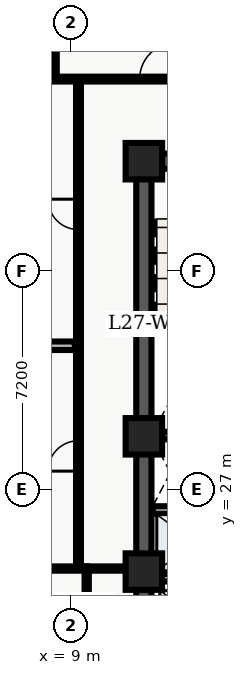
"""IFC4 building model, lengths in metres.
Left out: names, types, materials, properties, quantities, classifications, styles, units other than length and angle.
Written with IfcOpenShell. Run it as: python <this file> out.ifc"""

import sys

from ifc_helpers import new_model, entity, si_unit, converted_unit, direction, frame, origin_with_axes, origin_2d_with_axis, place, context, subcontext, project, spatial, polyline, rectangle, outline, extrude, element, fill, save


model = new_model("IFC4")
c1 = context("Model", 3, precision=1e-05, world=origin_with_axes(), true_north=direction((0.0, 1.0)))
c2 = subcontext(c1, "Body", "Model", "MODEL_VIEW")
j1 = project(units=[si_unit("LENGTHUNIT", "METRE"), converted_unit("PLANEANGLEUNIT", "DEGREE", entity("IfcPlaneAngleMeasure", 0.017), si_unit("PLANEANGLEUNIT", "RADIAN"), dimensions=[0, 0, 0, 0, 0, 0, 0])], contexts=[c1])
p1 = place(None, origin_with_axes())
s1 = spatial("IfcSite", under=j1, at=p1, CompositionType="ELEMENT")
p2 = place(p1, origin_with_axes())
s2 = spatial("IfcBuilding", under=s1, at=p2, CompositionType="ELEMENT")
p3 = place(p2, frame((0.0, 0.0, 112.5), z_axis=(0.0, 0.0, 1.0), x_axis=(1.0, 0.0, 0.0)))
s3 = spatial("IfcBuildingStorey", under=s2, at=p3, CompositionType="ELEMENT", Elevation=112.5)
p4 = place(p3, frame((11.4, 10.8, 0.0), z_axis=(0.0, 0.0, 1.0), x_axis=(0.0, 1.0, 0.0)))
e1 = element("IfcWall", 1, at=p4, inside=s3, PredefinedType="SHEAR", context=c2, shape_type="SweptSolid", body=[
    extrude(outline(polyline([(0.0, -0.25), (27.0, -0.25), (27.0, 0.25), (0.0, 0.25), (0.0, -0.25)])), origin_with_axes(), (0.0, 0.0, 1.0), 3.66),
])
p5 = place(p3, frame((11.4, 37.8, 0.0), z_axis=(0.0, 0.0, 1.0), x_axis=(1.0, 0.0, 0.0)))
e2 = element("IfcWall", 2, at=p5, inside=s3, PredefinedType="SHEAR", context=c2, shape_type="SweptSolid", body=[
    extrude(outline(polyline([(0.0, -0.25), (7.2, -0.25), (7.2, 0.25), (0.0, 0.25), (0.0, -0.25)])), origin_with_axes(), (0.0, 0.0, 1.0), 3.66),
])
p6 = place(p5, frame((2.625, 0.0, 0.0), z_axis=(0.0, 0.0, 1.0), x_axis=(1.0, 0.0, 0.0)))
e3 = element("IfcOpeningElement", 3, at=p6, cuts=e2, PredefinedType="OPENING", context=c2, shape_type="SweptSolid", body=[
    extrude(rectangle(XDim=1.05, YDim=0.52, at=origin_2d_with_axis()), origin_with_axes(), (0.0, 0.0, 1.0), 2.15),
])
p7 = place(p3, frame((11.65, 28.775, 0.0), z_axis=(0.0, 0.0, 1.0), x_axis=(1.0, 0.0, 0.0)))
e4 = element("IfcWall", 4, at=p7, inside=s3, PredefinedType="SHEAR", context=c2, shape_type="SweptSolid", body=[
    extrude(outline(polyline([(0.0, -0.125), (6.7, -0.125), (6.7, 0.125), (0.0, 0.125), (0.0, -0.125)])), origin_with_axes(), (0.0, 0.0, 1.0), 3.66),
])
p8 = place(p3, frame((11.7, 24.1, 0.0), z_axis=(0.0, 0.0, 1.0), x_axis=(1.0, 0.0, 0.0)))
e5 = element("IfcWall", 5, at=p8, inside=s3, PredefinedType="SOLIDWALL", context=c2, shape_type="SweptSolid", body=[
    extrude(outline(polyline([(0.0, -0.125), (6.6, -0.125), (6.6, 0.125), (0.0, 0.125), (0.0, -0.125)])), origin_with_axes(), (0.0, 0.0, 1.0), 2.7),
])
p9 = place(p8, frame((3.6, 0.0, 0.0), z_axis=(0.0, 0.0, 1.0), x_axis=(1.0, 0.0, 0.0)))
e6 = element("IfcOpeningElement", 6, at=p9, cuts=e5, PredefinedType="OPENING", context=c2, shape_type="SweptSolid", body=[
    extrude(rectangle(XDim=0.9, YDim=0.27, at=origin_2d_with_axis()), origin_with_axes(), (0.0, 0.0, 1.0), 2.15),
])
p10 = place(p8, frame((5.65, 0.0, 0.0), z_axis=(0.0, 0.0, 1.0), x_axis=(1.0, 0.0, 0.0)))
e7 = element("IfcOpeningElement", 7, at=p10, cuts=e5, PredefinedType="OPENING", context=c2, shape_type="SweptSolid", body=[
    extrude(rectangle(XDim=0.9, YDim=0.27, at=origin_2d_with_axis()), origin_with_axes(), (0.0, 0.0, 1.0), 2.15),
])
p11 = place(p3, frame((11.7, 26.325, 0.0), z_axis=(0.0, 0.0, 1.0), x_axis=(1.0, 0.0, 0.0)))
e8 = element("IfcWall", 8, at=p11, inside=s3, PredefinedType="SOLIDWALL", context=c2, shape_type="SweptSolid", body=[
    extrude(outline(polyline([(0.0, -0.125), (6.6, -0.125), (6.6, 0.125), (0.0, 0.125), (0.0, -0.125)])), origin_with_axes(), (0.0, 0.0, 1.0), 2.7),
])
p12 = place(p11, frame((3.5, 0.0, 0.0), z_axis=(0.0, 0.0, 1.0), x_axis=(1.0, 0.0, 0.0)))
e9 = element("IfcOpeningElement", 9, at=p12, cuts=e8, PredefinedType="OPENING", context=c2, shape_type="SweptSolid", body=[
    extrude(rectangle(XDim=0.9, YDim=0.27, at=origin_2d_with_axis()), origin_with_axes(), (0.0, 0.0, 1.0), 2.15),
])
for number, where, z_axis, x_axis in (
    (10, (11.4, 24.3, 0.0), (0.0, 0.0, 1.0), (1.0, 0.0, 0.0)),
    (11, (11.4, 28.75, 0.0), (0.0, 0.0, 1.0), (1.0, 0.0, 0.0)),
    (12, (11.4, 37.8, 0.0), (0.0, 0.0, 1.0), (1.0, 0.0, 0.0)),
):
    element("IfcColumn", number, at=place(p3, frame(where, z_axis=z_axis, x_axis=x_axis)), inside=s3, PredefinedType="COLUMN", context=c2, shape_type="SweptSolid", body=[
        extrude(rectangle(XDim=1.2, YDim=1.2, at=origin_2d_with_axis()), origin_with_axes(), (0.0, 0.0, 1.0), 3.9),
    ])
p13 = place(p3, frame((9.52, 20.4, 0.0), z_axis=(0.0, 0.0, 1.0), x_axis=(0.0, 1.0, 0.0)))
e13 = element("IfcWall", 13, at=p13, inside=s3, PredefinedType="PARTITIONING", context=c2, shape_type="SweptSolid", body=[
    extrude(outline(polyline([(0.0, -0.07), (4.0, -0.07), (4.0, 0.07), (0.0, 0.07), (0.0, -0.07)])), origin_with_axes(), (0.0, 0.0, 1.0), 2.7),
])
p14 = place(p3, frame((9.52, 24.4, 0.0), z_axis=(0.0, 0.0, 1.0), x_axis=(1.0, 0.0, 0.0)))
e14 = element("IfcWall", 14, at=p14, inside=s3, PredefinedType="PARTITIONING", context=c2, shape_type="SweptSolid", body=[
    extrude(outline(polyline([(0.0, -0.07), (1.58, -0.07), (1.58, 0.07), (0.0, 0.07), (0.0, -0.07)])), origin_with_axes(), (0.0, 0.0, 1.0), 2.7),
])
p15 = place(p3, frame((2.6, 40.5, 0.0), z_axis=(0.0, 0.0, 1.0), x_axis=(1.0, 0.0, 0.0)))
e15 = element("IfcWall", 15, at=p15, inside=s3, PredefinedType="PARTITIONING", context=c2, shape_type="SweptSolid", body=[
    extrude(outline(polyline([(0.0, -0.08), (18.65, -0.08), (18.65, 0.08), (0.0, 0.08), (0.0, -0.08)])), origin_with_axes(), (0.0, 0.0, 1.0), 2.7),
])
p16 = place(p15, frame((2.045, 0.0, 0.0), z_axis=(0.0, 0.0, 1.0), x_axis=(1.0, 0.0, 0.0)))
e16 = element("IfcOpeningElement", 16, at=p16, cuts=e15, PredefinedType="OPENING", context=c2, shape_type="SweptSolid", body=[
    extrude(rectangle(XDim=1.0, YDim=0.18, at=origin_2d_with_axis()), origin_with_axes(), (0.0, 0.0, 1.0), 2.15),
])
p17 = place(p15, frame((9.261, 0.0, 0.0), z_axis=(0.0, 0.0, 1.0), x_axis=(1.0, 0.0, 0.0)))
e17 = element("IfcOpeningElement", 17, at=p17, cuts=e15, PredefinedType="OPENING", context=c2, shape_type="SweptSolid", body=[
    extrude(rectangle(XDim=1.2, YDim=0.18, at=origin_2d_with_axis()), origin_with_axes(), (0.0, 0.0, 1.0), 2.2),
])
p18 = place(p15, frame((14.541, 0.0, 0.0), z_axis=(0.0, 0.0, 1.0), x_axis=(1.0, 0.0, 0.0)))
e18 = element("IfcOpeningElement", 18, at=p18, cuts=e15, PredefinedType="OPENING", context=c2, shape_type="SweptSolid", body=[
    extrude(rectangle(XDim=1.0, YDim=0.18, at=origin_2d_with_axis()), origin_with_axes(), (0.0, 0.0, 1.0), 2.15),
])
p19 = place(p3, frame((9.25, 24.4, 0.0), z_axis=(0.0, 0.0, 1.0), x_axis=(0.0, 1.0, 0.0)))
e19 = element("IfcWall", 19, at=p19, inside=s3, PredefinedType="PARTITIONING", context=c2, shape_type="SweptSolid", body=[
    extrude(outline(polyline([(0.0, -0.08), (16.1, -0.08), (16.1, 0.08), (0.0, 0.08), (0.0, -0.08)])), origin_with_axes(), (0.0, 0.0, 1.0), 2.7),
])
p20 = place(p19, frame((3.704, 0.0, 0.0), z_axis=(0.0, 0.0, 1.0), x_axis=(1.0, 0.0, 0.0)))
e20 = element("IfcOpeningElement", 20, at=p20, cuts=e19, PredefinedType="OPENING", context=c2, shape_type="SweptSolid", body=[
    extrude(rectangle(XDim=1.0, YDim=0.18, at=origin_2d_with_axis()), origin_with_axes(), (0.0, 0.0, 1.0), 2.15),
])
p21 = place(p19, frame((11.649, 0.0, 0.0), z_axis=(0.0, 0.0, 1.0), x_axis=(1.0, 0.0, 0.0)))
e21 = element("IfcOpeningElement", 21, at=p21, cuts=e19, PredefinedType="OPENING", context=c2, shape_type="SweptSolid", body=[
    extrude(rectangle(XDim=1.0, YDim=0.18, at=origin_2d_with_axis()), origin_with_axes(), (0.0, 0.0, 1.0), 2.15),
])
p22 = place(p3, frame((0.36, 24.4, 0.0), z_axis=(0.0, 0.0, 1.0), x_axis=(1.0, 0.0, 0.0)))
e22 = element("IfcWall", 22, at=p22, inside=s3, PredefinedType="PARTITIONING", context=c2, shape_type="SweptSolid", body=[
    extrude(outline(polyline([(0.0, -0.07), (9.16, -0.07), (9.16, 0.07), (0.0, 0.07), (0.0, -0.07)])), origin_with_axes(), (0.0, 0.0, 1.0), 2.7),
])
p23 = place(p3, frame((0.375, 31.729, 0.0), z_axis=(0.0, 0.0, 1.0), x_axis=(1.0, 0.0, 0.0)))
e23 = element("IfcWall", 23, at=p23, inside=s3, PredefinedType="PARTITIONING", context=c2, shape_type="SweptSolid", body=[
    extrude(outline(polyline([(0.0, -0.14), (8.755, -0.14), (8.755, 0.14), (0.0, 0.14), (0.0, -0.14)])), origin_with_axes(), (0.0, 0.0, 1.0), 2.7),
])
p24 = place(p3, frame((8.46, 40.6, 0.0), z_axis=(0.0, 0.0, 1.0), x_axis=(0.0, 1.0, 0.0)))
e24 = element("IfcWall", 24, at=p24, inside=s3, PredefinedType="PARTITIONING", context=c2, shape_type="SweptSolid", body=[
    extrude(outline(polyline([(0.0, -0.075), (7.64, -0.075), (7.64, 0.075), (0.0, 0.075), (0.0, -0.075)])), origin_with_axes(), (0.0, 0.0, 1.0), 2.7),
])
p25 = place(p19, frame((3.704, 0.0, 0.0), z_axis=(0.0, 0.0, 1.0), x_axis=(1.0, 0.0, 0.0)))
e25 = element("IfcDoor", 25, at=p25, inside=s3, OperationType="SINGLE_SWING_LEFT", PredefinedType="DOOR", context=c2, shape_type="SweptSolid", body=[
    extrude(rectangle(XDim=1.0, YDim=0.09, at=origin_2d_with_axis()), origin_with_axes(), (0.0, 0.0, 1.0), 2.15),
])
fill(e20, e25)
p26 = place(p19, frame((11.649, 0.0, 0.0), z_axis=(0.0, 0.0, 1.0), x_axis=(1.0, 0.0, 0.0)))
e26 = element("IfcDoor", 26, at=p26, inside=s3, OperationType="SINGLE_SWING_RIGHT", PredefinedType="DOOR", context=c2, shape_type="SweptSolid", body=[
    extrude(rectangle(XDim=1.0, YDim=0.09, at=origin_2d_with_axis()), origin_with_axes(), (0.0, 0.0, 1.0), 2.15),
])
fill(e21, e26)
p27 = place(p15, frame((9.261, 0.0, 0.0), z_axis=(0.0, 0.0, 1.0), x_axis=(1.0, 0.0, 0.0)))
e27 = element("IfcDoor", 27, at=p27, inside=s3, OperationType="SINGLE_SWING_RIGHT", PredefinedType="DOOR", context=c2, shape_type="SweptSolid", body=[
    extrude(rectangle(XDim=1.2, YDim=0.09, at=origin_2d_with_axis()), origin_with_axes(), (0.0, 0.0, 1.0), 2.2),
])
fill(e17, e27)
save(model, sys.argv[1])
